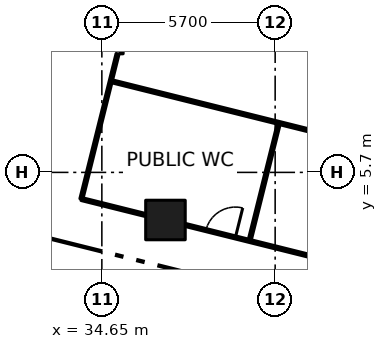
"""IFC4 building model, lengths in metres.
Left out: names, types, materials, properties, quantities, classifications, styles, units other than length and angle.
Written with IfcOpenShell. Run it as: python <this file> out.ifc"""

import sys

from ifc_helpers import new_model, si_unit, direction, frame, frame_2d, origin, origin_2d, place, context, subcontext, project, spatial, rectangle, extrude, element, fill, save


model = new_model("IFC4")
c1 = context("Model", 3, precision=1e-05, world=origin(), true_north=direction((0.0, 1.0)))
c2 = subcontext(c1, "Body", "Model", "MODEL_VIEW")
j1 = project(units=[si_unit("LENGTHUNIT", "METRE"), si_unit("PLANEANGLEUNIT", "RADIAN")], contexts=[c1])
p1 = place(None, origin())
s1 = spatial("IfcSite", under=j1, at=p1, CompositionType="ELEMENT")
p2 = place(p1, origin())
s2 = spatial("IfcBuilding", under=s1, at=p2, CompositionType="ELEMENT")
p3 = place(p2, frame((0.0, 0.0, 28.2)))
s3 = spatial("IfcBuildingStorey", under=s2, at=p3, CompositionType="ELEMENT", Elevation=28.2)
p4 = place(p3, frame((36.742, 4.134, 0.0), z_axis=(0.0, 0.0, 1.0), x_axis=(1.0, 0.0, 0.0)))
e1 = element("IfcColumn", 1, at=p4, inside=s3, PredefinedType="COLUMN", context=c2, shape_type="SweptSolid", body=[
    extrude(rectangle(XDim=1.3, YDim=1.3, at=origin_2d()), origin(), (0.0, 0.0, 1.0), 4.8),
])
p5 = place(p3, frame((33.976, 4.824, 0.0), z_axis=(0.0, 0.0, 1.0), x_axis=(0.241940400058, 0.970291112409, 0.0)))
e2 = element("IfcWall", 2, at=p5, inside=s3, PredefinedType="PARTITIONING", context=c2, shape_type="SweptSolid", body=[
    extrude(rectangle(XDim=4.922, YDim=0.1, at=frame_2d((2.461, 0.0))), origin(), (0.0, 0.0, 1.0), 4.35),
])
p6 = place(p3, frame((35.3, 9.6, 0.0), z_axis=(0.0, 0.0, 1.0), x_axis=(0.0, 1.0, 0.0)))
e3 = element("IfcWall", 3, at=p6, inside=s3, PredefinedType="PARTITIONING", context=c2, shape_type="SweptSolid", body=[
    extrude(rectangle(XDim=12.675, YDim=0.1, at=frame_2d((6.337, 0.0))), origin(), (0.0, 0.0, 1.0), 4.35),
])
p7 = place(p6, frame((1.68, 0.0, 0.0)))
e4 = element("IfcOpeningElement", 4, at=p7, cuts=e3, PredefinedType="OPENING", context=c2, shape_type="SweptSolid", body=[
    extrude(rectangle(XDim=1.8, YDim=2.1, at=frame_2d((0.9, 1.05))), frame((0.0, 0.06, 0.0), z_axis=(0.0, -1.0, 0.0), x_axis=(1.0, 0.0, 0.0)), (0.0, 0.0, 1.0), 0.12),
])
p8 = place(p6, frame((8.18, 0.0, 0.0)))
e5 = element("IfcOpeningElement", 5, at=p8, cuts=e3, PredefinedType="OPENING", context=c2, shape_type="SweptSolid", body=[
    extrude(rectangle(XDim=1.0, YDim=2.1, at=frame_2d((0.5, 1.05))), frame((0.0, 0.06, 0.0), z_axis=(0.0, -1.0, 0.0), x_axis=(1.0, 0.0, 0.0)), (0.0, 0.0, 1.0), 0.12),
])
p9 = place(p3, frame((36.072, 4.301, 0.0), z_axis=(0.0, 0.0, 1.0), x_axis=(-0.970255412337, 0.242083528623, 0.0)))
e6 = element("IfcWall", 6, at=p9, inside=s3, PredefinedType="PARTITIONING", context=c2, shape_type="SweptSolid", body=[
    extrude(rectangle(XDim=2.16, YDim=0.1, at=frame_2d((1.08, 0.0))), origin(), (0.0, 0.0, 1.0), 4.35),
])
p10 = place(p3, frame((37.412, 3.967, 0.0), z_axis=(0.0, 0.0, 1.0), x_axis=(0.970335093604, -0.241763947107, 0.0)))
e7 = element("IfcWall", 7, at=p10, inside=s3, PredefinedType="PARTITIONING", context=c2, shape_type="SweptSolid", body=[
    extrude(rectangle(XDim=4.318, YDim=0.1, at=frame_2d((2.159, 0.0))), origin(), (0.0, 0.0, 1.0), 4.35),
])
p11 = place(p10, frame((0.68, 0.0, 0.0)))
e8 = element("IfcOpeningElement", 8, at=p11, cuts=e7, PredefinedType="OPENING", context=c2, shape_type="SweptSolid", body=[
    extrude(rectangle(XDim=1.0, YDim=2.1, at=frame_2d((0.5, 1.05))), frame((0.0, 0.06, 0.0), z_axis=(0.0, -1.0, 0.0), x_axis=(1.0, 0.0, 0.0)), (0.0, 0.0, 1.0), 0.12),
])
p12 = place(p3, frame((34.993, 8.693, 0.0), z_axis=(0.0, 0.0, 1.0), x_axis=(0.97029161727, -0.241938375328, 0.0)))
e9 = element("IfcWall", 9, at=p12, inside=s3, PredefinedType="PARTITIONING", context=c2, shape_type="SweptSolid", body=[
    extrude(rectangle(XDim=11.35, YDim=0.1, at=frame_2d((5.675, 0.0))), origin(), (0.0, 0.0, 1.0), 4.35),
])
p13 = place(p3, frame((39.519, 3.494, 0.0), z_axis=(0.0, 0.0, 1.0), x_axis=(0.242064152871, 0.970260246478, 0.0)))
e10 = element("IfcWall", 10, at=p13, inside=s3, PredefinedType="PARTITIONING", context=c2, shape_type="SweptSolid", body=[
    extrude(rectangle(XDim=3.899, YDim=0.1, at=frame_2d((1.95, 0.0))), origin(), (0.0, 0.0, 1.0), 4.35),
])
p14 = place(p11, origin())
e11 = element("IfcDoor", 11, at=p14, inside=s3, OperationType="SINGLE_SWING_RIGHT", PredefinedType="DOOR", context=c2, shape_type="SweptSolid", body=[
    extrude(rectangle(XDim=1.0, YDim=2.1, at=frame_2d((0.5, 1.05))), frame((0.0, 0.025, 0.0), z_axis=(0.0, -1.0, 0.0), x_axis=(1.0, 0.0, 0.0)), (0.0, 0.0, 1.0), 0.05),
])
fill(e8, e11)
save(model, sys.argv[1])
